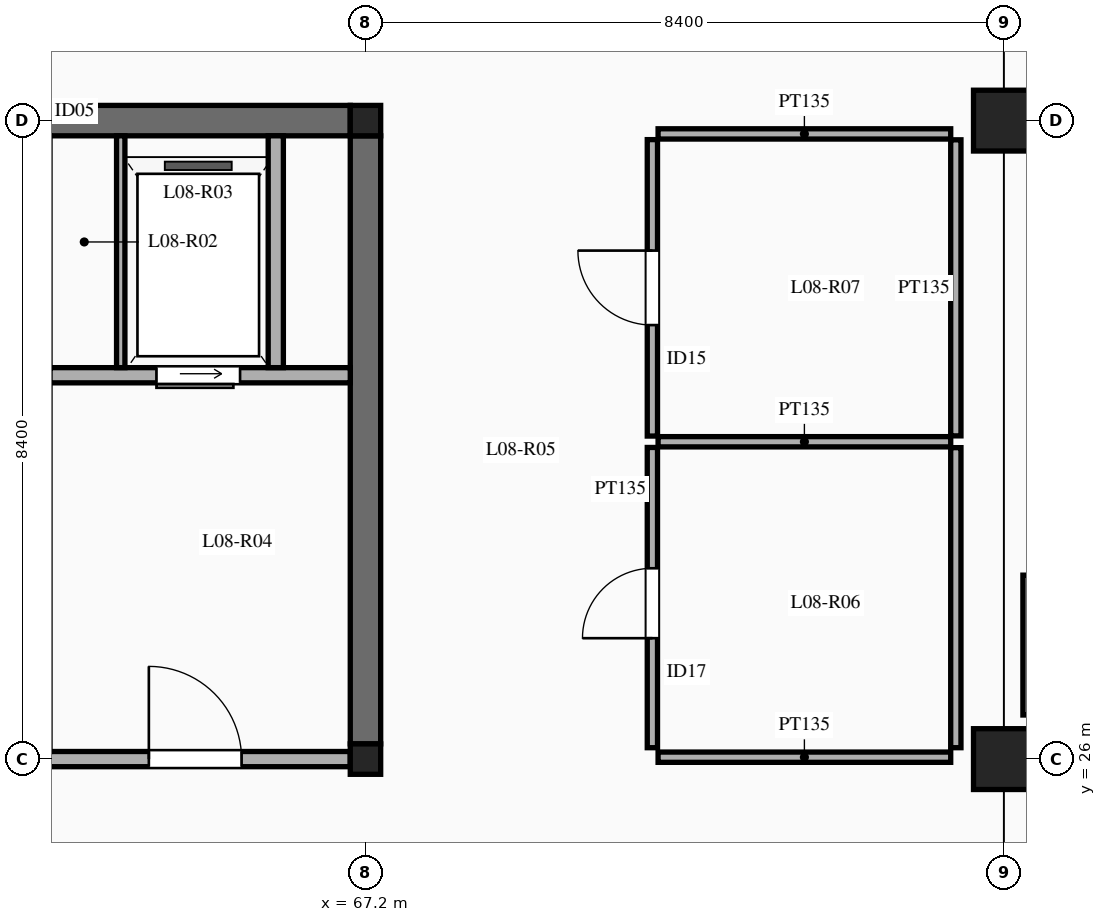
"""IFC4 building model, lengths in metres.
Left out: names, types, materials, properties, quantities, classifications, styles, units other than length and angle.
Written with IfcOpenShell. Run it as: python <this file> out.ifc"""

import sys

from ifc_helpers import new_model, si_unit, direction, frame, frame_2d, origin, origin_2d, place, context, subcontext, project, spatial, rectangle, extrude, element, fill, save


model = new_model("IFC4")
c1 = context("Model", 3, precision=1e-05, world=origin(), true_north=direction((0.0, 1.0)))
c2 = subcontext(c1, "Body", "Model", "MODEL_VIEW")
j1 = project(units=[si_unit("LENGTHUNIT", "METRE"), si_unit("PLANEANGLEUNIT", "RADIAN")], contexts=[c1])
p1 = place(None, origin())
s1 = spatial("IfcSite", under=j1, at=p1, CompositionType="ELEMENT")
p2 = place(p1, origin())
s2 = spatial("IfcBuilding", under=s1, at=p2, CompositionType="ELEMENT")
p3 = place(p2, frame((0.0, 0.0, 37.5)))
s3 = spatial("IfcBuildingStorey", under=s2, at=p3, CompositionType="ELEMENT", Elevation=37.5)
for number, where, z_axis, x_axis in (
    (1, (67.2, 26.0, 0.0), (0.0, 0.0, 1.0), (1.0, 0.0, 0.0)),
    (2, (67.2, 34.4, 0.0), (0.0, 0.0, 1.0), (1.0, 0.0, 0.0)),
):
    element("IfcColumn", number, at=place(p3, frame(where, z_axis=z_axis, x_axis=x_axis)), inside=s3, PredefinedType="COLUMN", context=c2, shape_type="SweptSolid", body=[
        extrude(rectangle(XDim=0.4, YDim=0.4, at=origin_2d()), origin(), (0.0, 0.0, 1.0), 4.5),
    ])
for number, where, z_axis, x_axis in (
    (3, (75.6, 26.0, 0.0), (0.0, 0.0, 1.0), (1.0, 0.0, 0.0)),
    (4, (75.6, 34.4, 0.0), (0.0, 0.0, 1.0), (1.0, 0.0, 0.0)),
):
    element("IfcColumn", number, at=place(p3, frame(where, z_axis=z_axis, x_axis=x_axis)), inside=s3, PredefinedType="COLUMN", context=c2, shape_type="SweptSolid", body=[
        extrude(rectangle(XDim=0.8, YDim=0.8, at=origin_2d()), origin(), (0.0, 0.0, 1.0), 4.5),
    ])
for number, where, z_axis, x_axis in (
    (5, (67.2, 26.2, 0.0), (0.0, 0.0, 1.0), (0.0, 1.0, 0.0)),
    (6, (59.0, 34.4, 0.0), (0.0, 0.0, 1.0), (1.0, 0.0, 0.0)),
):
    element("IfcWall", number, at=place(p3, frame(where, z_axis=z_axis, x_axis=x_axis)), inside=s3, PredefinedType="SHEAR", context=c2, shape_type="SweptSolid", body=[
        extrude(rectangle(XDim=8.0, YDim=0.4, at=frame_2d((4.0, 0.0))), origin(), (0.0, 0.0, 1.0), 4.5),
    ])
p4 = place(p3, frame((59.0, 26.0, 0.0), z_axis=(0.0, 0.0, 1.0), x_axis=(1.0, 0.0, 0.0)))
e7 = element("IfcWall", 7, at=p4, inside=s3, PredefinedType="SOLIDWALL", context=c2, shape_type="SweptSolid", body=[
    extrude(rectangle(XDim=8.0, YDim=0.2, at=frame_2d((4.0, 0.0))), origin(), (0.0, 0.0, 1.0), 3.78),
])
p5 = place(p4, frame((1.55, 0.0, 0.0)))
e8 = element("IfcOpeningElement", 8, at=p5, cuts=e7, PredefinedType="OPENING", context=c2, shape_type="SweptSolid", body=[
    extrude(rectangle(XDim=1.15, YDim=2.15, at=frame_2d((0.575, 1.075))), frame((0.0, 0.11, 0.0), z_axis=(0.0, -1.0, 0.0), x_axis=(1.0, 0.0, 0.0)), (0.0, 0.0, 1.0), 0.22),
])
p6 = place(p4, frame((5.35, 0.0, 0.0)))
e9 = element("IfcOpeningElement", 9, at=p6, cuts=e7, PredefinedType="OPENING", context=c2, shape_type="SweptSolid", body=[
    extrude(rectangle(XDim=1.22, YDim=2.15, at=frame_2d((0.61, 1.075))), frame((0.0, 0.11, 0.0), z_axis=(0.0, -1.0, 0.0), x_axis=(1.0, 0.0, 0.0)), (0.0, 0.0, 1.0), 0.22),
])
p7 = place(p3, frame((63.05, 31.05, 0.0), z_axis=(0.0, 0.0, 1.0), x_axis=(1.0, 0.0, 0.0)))
e10 = element("IfcWall", 10, at=p7, inside=s3, PredefinedType="SOLIDWALL", context=c2, shape_type="SweptSolid", body=[
    extrude(rectangle(XDim=3.95, YDim=0.2, at=frame_2d((1.975, 0.0))), origin(), (0.0, 0.0, 1.0), 4.3),
])
p8 = place(p7, frame((1.4, 0.0, 0.0)))
e11 = element("IfcOpeningElement", 11, at=p8, cuts=e10, PredefinedType="OPENING", context=c2, shape_type="SweptSolid", body=[
    extrude(rectangle(XDim=1.1, YDim=2.15, at=frame_2d((0.55, 1.075))), frame((0.0, 0.11, 0.0), z_axis=(0.0, -1.0, 0.0), x_axis=(1.0, 0.0, 0.0)), (0.0, 0.0, 1.0), 0.22),
])
p9 = place(p3, frame((63.98, 31.15, 0.0), z_axis=(0.0, 0.0, 1.0), x_axis=(0.0, 1.0, 0.0)))
e12 = element("IfcWall", 12, at=p9, inside=s3, PredefinedType="PARTITIONING", context=c2, shape_type="SweptSolid", body=[
    extrude(rectangle(XDim=3.05, YDim=0.11, at=frame_2d((1.525, 0.0))), origin(), (0.0, 0.0, 1.0), 4.3),
])
p10 = place(p3, frame((66.02, 31.15, 0.0), z_axis=(0.0, 0.0, 1.0), x_axis=(0.0, 1.0, 0.0)))
e13 = element("IfcWall", 13, at=p10, inside=s3, PredefinedType="SOLIDWALL", context=c2, shape_type="SweptSolid", body=[
    extrude(rectangle(XDim=3.05, YDim=0.2, at=frame_2d((1.525, 0.0))), origin(), (0.0, 0.0, 1.0), 4.3),
])
p11 = place(p3, frame((75.95, 26.58, 0.0), z_axis=(0.0, 0.0, 1.0), x_axis=(0.0, 1.0, 0.0)))
e14 = element("IfcWall", 14, at=p11, inside=s3, PredefinedType="SOLIDWALL", context=c2, shape_type="SweptSolid", body=[
    extrude(rectangle(XDim=1.84, YDim=0.2, at=frame_2d((0.92, 0.0))), origin(), (0.0, 0.0, 1.0), 4.3),
])
p12 = place(p3, frame((70.975, 26.15, 0.0), z_axis=(0.0, 0.0, 1.0), x_axis=(0.0, 1.0, 0.0)))
e15 = element("IfcWall", 15, at=p12, inside=s3, PredefinedType="PARTITIONING", context=c2, shape_type="SweptSolid", body=[
    extrude(rectangle(XDim=3.95, YDim=0.135, at=frame_2d((1.975, 0.0))), origin(), (0.0, 0.0, 1.0), 3.45),
])
p13 = place(p12, frame((1.441, 0.0, 0.0)))
e16 = element("IfcOpeningElement", 16, at=p13, cuts=e15, PredefinedType="OPENING", context=c2, shape_type="SweptSolid", body=[
    extrude(rectangle(XDim=0.92, YDim=2.12, at=frame_2d((0.46, 1.06))), frame((0.0, 0.077, 0.0), z_axis=(0.0, -1.0, 0.0), x_axis=(1.0, 0.0, 0.0)), (0.0, 0.0, 1.0), 0.155),
])
p14 = place(p3, frame((70.975, 30.25, 0.0), z_axis=(0.0, 0.0, 1.0), x_axis=(0.0, 1.0, 0.0)))
e17 = element("IfcWall", 17, at=p14, inside=s3, PredefinedType="PARTITIONING", context=c2, shape_type="SweptSolid", body=[
    extrude(rectangle(XDim=3.9, YDim=0.135, at=frame_2d((1.95, 0.0))), origin(), (0.0, 0.0, 1.0), 3.45),
])
p15 = place(p14, frame((1.46, 0.0, 0.0)))
e18 = element("IfcOpeningElement", 18, at=p15, cuts=e17, PredefinedType="OPENING", context=c2, shape_type="SweptSolid", body=[
    extrude(rectangle(XDim=0.98, YDim=2.15, at=frame_2d((0.49, 1.075))), frame((0.0, 0.077, 0.0), z_axis=(0.0, -1.0, 0.0), x_axis=(1.0, 0.0, 0.0)), (0.0, 0.0, 1.0), 0.155),
])
for number, where, z_axis, x_axis in (
    (19, (71.05, 30.175, 0.0), (0.0, 0.0, 1.0), (1.0, 0.0, 0.0)),
    (20, (71.05, 26.025, 0.0), (0.0, 0.0, 1.0), (1.0, 0.0, 0.0)),
    (21, (71.05, 34.225, 0.0), (0.0, 0.0, 1.0), (1.0, 0.0, 0.0)),
):
    element("IfcWall", number, at=place(p3, frame(where, z_axis=z_axis, x_axis=x_axis)), inside=s3, PredefinedType="PARTITIONING", context=c2, shape_type="SweptSolid", body=[
        extrude(rectangle(XDim=3.85, YDim=0.135, at=frame_2d((1.925, 0.0))), origin(), (0.0, 0.0, 1.0), 3.45),
    ])
p16 = place(p3, frame((74.968, 26.15, 0.0), z_axis=(0.0, 0.0, 1.0), x_axis=(0.0, 1.0, 0.0)))
e22 = element("IfcWall", 22, at=p16, inside=s3, PredefinedType="PARTITIONING", context=c2, shape_type="SweptSolid", body=[
    extrude(rectangle(XDim=3.948, YDim=0.135, at=frame_2d((1.974, 0.0))), origin(), (0.0, 0.0, 1.0), 3.45),
])
p17 = place(p3, frame((74.968, 30.252, 0.0), z_axis=(0.0, 0.0, 1.0), x_axis=(0.0, 1.0, 0.0)))
e23 = element("IfcWall", 23, at=p17, inside=s3, PredefinedType="PARTITIONING", context=c2, shape_type="SweptSolid", body=[
    extrude(rectangle(XDim=3.895, YDim=0.135, at=frame_2d((1.948, 0.0))), origin(), (0.0, 0.0, 1.0), 3.45),
])
p18 = place(p6, origin())
e24 = element("IfcDoor", 24, at=p18, inside=s3, OperationType="SINGLE_SWING_LEFT", PredefinedType="DOOR", context=c2, shape_type="SweptSolid", body=[
    extrude(rectangle(XDim=1.22, YDim=2.15, at=frame_2d((0.61, 1.075))), frame((0.0, 0.025, 0.0), z_axis=(0.0, -1.0, 0.0), x_axis=(1.0, 0.0, 0.0)), (0.0, 0.0, 1.0), 0.05),
])
fill(e9, e24)
p19 = place(p8, frame((1.1, 0.0, 0.0), z_axis=(0.0, 0.0, 1.0), x_axis=(-1.0, 0.0, 0.0)))
e25 = element("IfcDoor", 25, at=p19, inside=s3, OperationType="SLIDING_TO_LEFT", PredefinedType="DOOR", context=c2, shape_type="SweptSolid", body=[
    extrude(rectangle(XDim=1.1, YDim=2.15, at=frame_2d((0.55, 1.075))), frame((0.0, 0.025, 0.0), z_axis=(0.0, -1.0, 0.0), x_axis=(1.0, 0.0, 0.0)), (0.0, 0.0, 1.0), 0.05),
])
fill(e11, e25)
p20 = place(p13, origin())
e26 = element("IfcDoor", 26, at=p20, inside=s3, OperationType="SINGLE_SWING_LEFT", PredefinedType="DOOR", context=c2, shape_type="SweptSolid", body=[
    extrude(rectangle(XDim=0.92, YDim=2.12, at=frame_2d((0.46, 1.06))), frame((0.0, 0.025, 0.0), z_axis=(0.0, -1.0, 0.0), x_axis=(1.0, 0.0, 0.0)), (0.0, 0.0, 1.0), 0.05),
])
fill(e16, e26)
p21 = place(p15, origin())
e27 = element("IfcDoor", 27, at=p21, inside=s3, OperationType="SINGLE_SWING_RIGHT", PredefinedType="DOOR", context=c2, shape_type="SweptSolid", body=[
    extrude(rectangle(XDim=0.98, YDim=2.15, at=frame_2d((0.49, 1.075))), frame((0.0, 0.025, 0.0), z_axis=(0.0, -1.0, 0.0), x_axis=(1.0, 0.0, 0.0)), (0.0, 0.0, 1.0), 0.05),
])
fill(e18, e27)
save(model, sys.argv[1])
